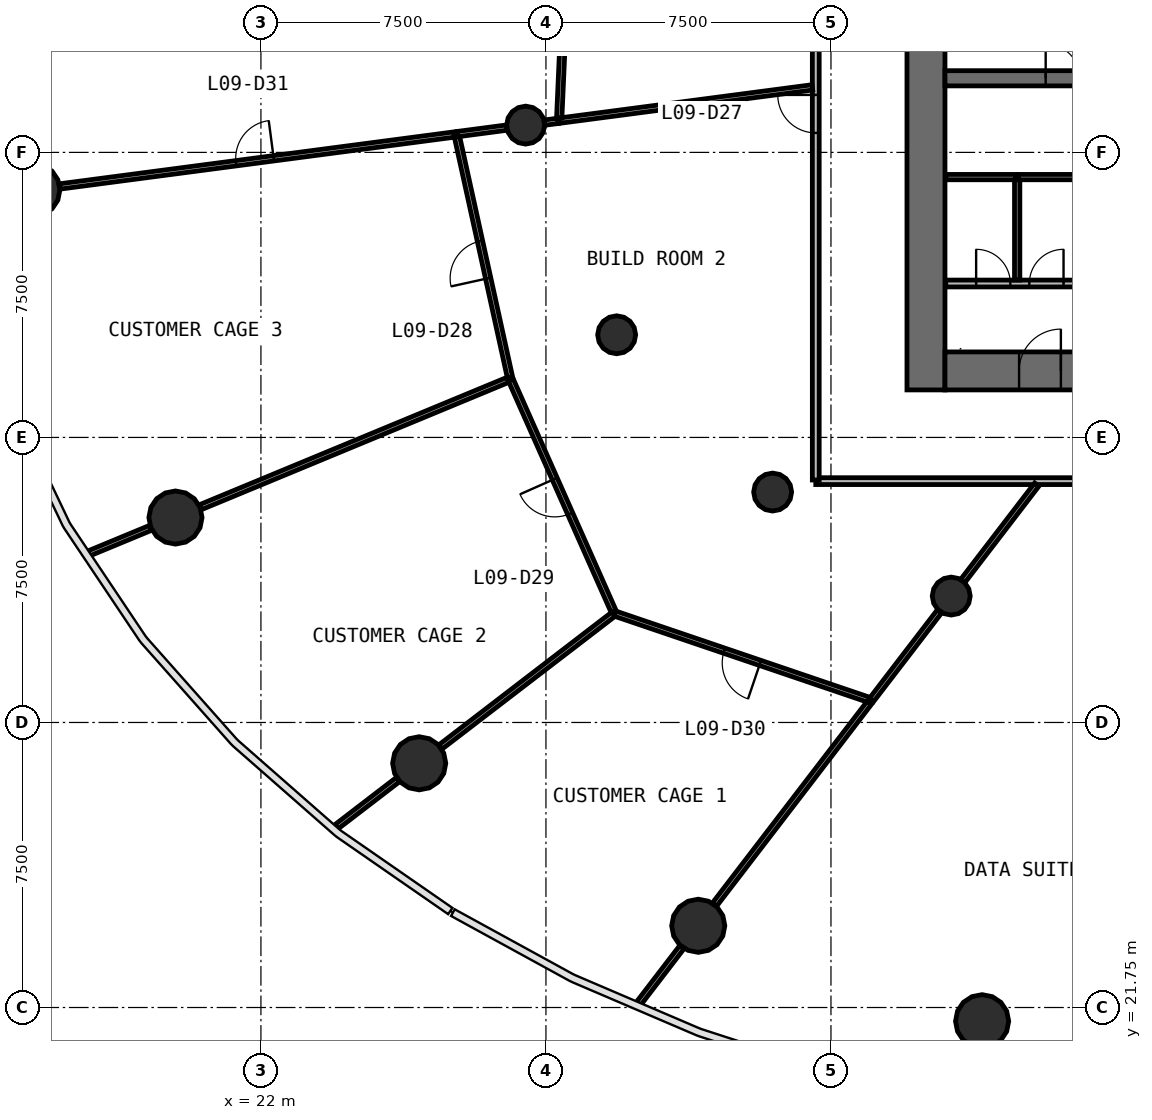
"""IFC4 building model, lengths in metres.
Left out: names, types, materials, properties, quantities, classifications, styles, units other than length and angle.
Written with IfcOpenShell. Run it as: python <this file> out.ifc"""

import sys

from ifc_helpers import new_model, si_unit, direction, frame, frame_2d, origin, origin_2d, place, context, subcontext, project, spatial, rectangle, circle, extrude, source, transform, mapped, element, fill, save


model = new_model("IFC4")
c1 = context("Model", 3, precision=1e-05, world=origin(), true_north=direction((0.0, 1.0)))
c2 = subcontext(c1, "Body", "Model", "MODEL_VIEW")
j1 = project(units=[si_unit("LENGTHUNIT", "METRE"), si_unit("PLANEANGLEUNIT", "RADIAN")], contexts=[c1])
p1 = place(None, origin())
s1 = spatial("IfcSite", under=j1, at=p1, CompositionType="ELEMENT")
p2 = place(p1, origin())
s2 = spatial("IfcBuilding", under=s1, at=p2, CompositionType="ELEMENT")
p3 = place(p2, frame((0.0, 0.0, 40.2)))
s3 = spatial("IfcBuildingStorey", under=s2, at=p3, CompositionType="ELEMENT", Elevation=40.2)
p4 = place(p3, frame((39.5, 58.0, 0.0), z_axis=(0.0, 0.0, 1.0), x_axis=(0.0, -1.0, 0.0)))
e1 = element("IfcWall", 1, at=p4, inside=s3, PredefinedType="SHEAR", context=c2, shape_type="SweptSolid", body=[
    extrude(rectangle(XDim=20.0, YDim=1.0, at=frame_2d((10.0, 0.0))), origin(), (0.0, 0.0, 1.0), 4.4),
])
p5 = place(p4, frame((9.1, 0.0, 0.0)))
e2 = element("IfcOpeningElement", 2, at=p5, cuts=e1, PredefinedType="OPENING", context=c2, shape_type="SweptSolid", body=[
    extrude(rectangle(XDim=1.8, YDim=2.1, at=frame_2d((0.9, 1.05))), frame((0.0, 0.51, 0.0), z_axis=(0.0, -1.0, 0.0), x_axis=(1.0, 0.0, 0.0)), (0.0, 0.0, 1.0), 1.02),
])
p6 = place(p3, frame((40.0, 38.5, 0.0), z_axis=(0.0, 0.0, 1.0), x_axis=(1.0, 0.0, 0.0)))
e3 = element("IfcWall", 3, at=p6, inside=s3, PredefinedType="SHEAR", context=c2, shape_type="SweptSolid", body=[
    extrude(rectangle(XDim=24.0, YDim=1.0, at=frame_2d((12.0, 0.0))), origin(), (0.0, 0.0, 1.0), 4.4),
])
p7 = place(p6, frame((21.45, 0.0, 0.0)))
e4 = element("IfcOpeningElement", 4, at=p7, cuts=e3, PredefinedType="OPENING", context=c2, shape_type="SweptSolid", body=[
    extrude(rectangle(XDim=1.1, YDim=2.1, at=frame_2d((0.55, 1.05))), frame((0.0, 0.51, 0.0), z_axis=(0.0, -1.0, 0.0), x_axis=(1.0, 0.0, 0.0)), (0.0, 0.0, 1.0), 1.02),
])
p8 = place(p6, frame((1.95, 0.0, 0.0)))
e5 = element("IfcOpeningElement", 5, at=p8, cuts=e3, PredefinedType="OPENING", context=c2, shape_type="SweptSolid", body=[
    extrude(rectangle(XDim=1.1, YDim=2.1, at=frame_2d((0.55, 1.05))), frame((0.0, 0.51, 0.0), z_axis=(0.0, -1.0, 0.0), x_axis=(1.0, 0.0, 0.0)), (0.0, 0.0, 1.0), 1.02),
])
p9 = place(p3, frame((40.0, 46.2, 0.0), z_axis=(0.0, 0.0, 1.0), x_axis=(1.0, 0.0, 0.0)))
e6 = element("IfcWall", 6, at=p9, inside=s3, PredefinedType="SHEAR", context=c2, shape_type="SweptSolid", body=[
    extrude(rectangle(XDim=24.0, YDim=0.4, at=frame_2d((12.0, 0.0))), origin(), (0.0, 0.0, 1.0), 4.4),
])
p10 = place(p9, frame((4.5, 0.0, 0.0)))
e7 = element("IfcOpeningElement", 7, at=p10, cuts=e6, PredefinedType="OPENING", context=c2, shape_type="SweptSolid", body=[
    extrude(rectangle(XDim=1.1, YDim=2.1, at=frame_2d((0.55, 1.05))), frame((0.0, 0.21, 0.0), z_axis=(0.0, -1.0, 0.0), x_axis=(1.0, 0.0, 0.0)), (0.0, 0.0, 1.0), 0.42),
])
p11 = place(p9, frame((7.0, 0.0, 0.0)))
e8 = element("IfcOpeningElement", 8, at=p11, cuts=e6, PredefinedType="OPENING", context=c2, shape_type="SweptSolid", body=[
    extrude(rectangle(XDim=1.1, YDim=2.1, at=frame_2d((0.55, 1.05))), frame((0.0, 0.21, 0.0), z_axis=(0.0, -1.0, 0.0), x_axis=(1.0, 0.0, 0.0)), (0.0, 0.0, 1.0), 0.42),
])
p12 = place(p9, frame((9.5, 0.0, 0.0)))
e9 = element("IfcOpeningElement", 9, at=p12, cuts=e6, PredefinedType="OPENING", context=c2, shape_type="SweptSolid", body=[
    extrude(rectangle(XDim=1.1, YDim=2.1, at=frame_2d((0.55, 1.05))), frame((0.0, 0.21, 0.0), z_axis=(0.0, -1.0, 0.0), x_axis=(1.0, 0.0, 0.0)), (0.0, 0.0, 1.0), 0.42),
])
p13 = place(p9, frame((20.45, 0.0, 0.0)))
e10 = element("IfcOpeningElement", 10, at=p13, cuts=e6, PredefinedType="OPENING", context=c2, shape_type="SweptSolid", body=[
    extrude(rectangle(XDim=0.9, YDim=2.1, at=frame_2d((0.45, 1.05))), frame((0.0, 0.21, 0.0), z_axis=(0.0, -1.0, 0.0), x_axis=(1.0, 0.0, 0.0)), (0.0, 0.0, 1.0), 0.42),
])
p14 = place(p9, frame((2.65, 0.0, 0.0)))
e11 = element("IfcOpeningElement", 11, at=p14, cuts=e6, PredefinedType="OPENING", context=c2, shape_type="SweptSolid", body=[
    extrude(rectangle(XDim=0.9, YDim=2.1, at=frame_2d((0.45, 1.05))), frame((0.0, 0.21, 0.0), z_axis=(0.0, -1.0, 0.0), x_axis=(1.0, 0.0, 0.0)), (0.0, 0.0, 1.0), 0.42),
])
p15 = place(p9, frame((11.65, 0.0, 0.0)))
e12 = element("IfcOpeningElement", 12, at=p15, cuts=e6, PredefinedType="OPENING", context=c2, shape_type="SweptSolid", body=[
    extrude(rectangle(XDim=0.9, YDim=2.1, at=frame_2d((0.45, 1.05))), frame((0.0, 0.21, 0.0), z_axis=(0.0, -1.0, 0.0), x_axis=(1.0, 0.0, 0.0)), (0.0, 0.0, 1.0), 0.42),
])
m1 = source(origin(), c2, "Body", "SweptSolid", [
    extrude(circle(Radius=0.7, at=origin_2d()), origin(), (0.0, 0.0, 1.0), 4.4),
])
for number, where, z_axis, x_axis in (
    (13, (16.01, 43.262, 0.0), (0.0, 0.0, 1.0), (1.0, 0.0, 0.0)),
    (14, (19.751, 34.642, 0.0), (0.0, 0.0, 1.0), (1.0, 0.0, 0.0)),
    (15, (26.164, 28.176, 0.0), (0.0, 0.0, 1.0), (1.0, 0.0, 0.0)),
    (16, (33.508, 23.9, 0.0), (0.0, 0.0, 1.0), (1.0, 0.0, 0.0)),
    (17, (40.977, 21.389, 0.0), (0.0, 0.0, 1.0), (1.0, 0.0, 0.0)),
):
    element("IfcColumn", number, at=place(p3, frame(where, z_axis=z_axis, x_axis=x_axis)), inside=s3, PredefinedType="COLUMN", context=c2, shape_type="MappedRepresentation", body=[
        mapped(m1, transform((0.0, 0.0, 0.0), scale=1.0)),
    ])
m2 = source(origin(), c2, "Body", "SweptSolid", [
    extrude(circle(Radius=0.5, at=origin_2d()), origin(), (0.0, 0.0, 1.0), 4.4),
])
for number, where, z_axis, x_axis in (
    (18, (28.966, 44.968, 0.0), (0.0, 0.0, 1.0), (1.0, 0.0, 0.0)),
    (19, (31.361, 39.451, 0.0), (0.0, 0.0, 1.0), (1.0, 0.0, 0.0)),
    (20, (35.465, 35.312, 0.0), (0.0, 0.0, 1.0), (1.0, 0.0, 0.0)),
    (21, (40.165, 32.576, 0.0), (0.0, 0.0, 1.0), (1.0, 0.0, 0.0)),
):
    element("IfcColumn", number, at=place(p3, frame(where, z_axis=z_axis, x_axis=x_axis)), inside=s3, PredefinedType="COLUMN", context=c2, shape_type="MappedRepresentation", body=[
        mapped(m2, transform((0.0, 0.0, 0.0), scale=1.0)),
    ])
p16 = place(p3, frame((67.4, 35.6, 0.0), z_axis=(0.0, 0.0, 1.0), x_axis=(-1.0, 0.0, 0.0)))
e22 = element("IfcWall", 22, at=p16, inside=s3, PredefinedType="PARTITIONING", context=c2, shape_type="SweptSolid", body=[
    extrude(rectangle(XDim=30.8, YDim=0.18, at=frame_2d((15.4, 0.0))), origin(), (0.0, 0.0, 1.0), 3.05),
])
p17 = place(p16, frame((17.35, 0.0, 0.0)))
e23 = element("IfcOpeningElement", 23, at=p17, cuts=e22, PredefinedType="OPENING", context=c2, shape_type="SweptSolid", body=[
    extrude(rectangle(XDim=1.0, YDim=2.1, at=frame_2d((0.5, 1.05))), frame((0.0, 0.1, 0.0), z_axis=(0.0, -1.0, 0.0), x_axis=(1.0, 0.0, 0.0)), (0.0, 0.0, 1.0), 0.2),
])
p18 = place(p16, frame((14.95, 0.0, 0.0)))
e24 = element("IfcOpeningElement", 24, at=p18, cuts=e22, PredefinedType="OPENING", context=c2, shape_type="SweptSolid", body=[
    extrude(rectangle(XDim=1.0, YDim=2.1, at=frame_2d((0.5, 1.05))), frame((0.0, 0.1, 0.0), z_axis=(0.0, -1.0, 0.0), x_axis=(1.0, 0.0, 0.0)), (0.0, 0.0, 1.0), 0.2),
])
p19 = place(p3, frame((36.6, 35.63, 0.0), z_axis=(0.0, 0.0, 1.0), x_axis=(0.0, 1.0, 0.0)))
e25 = element("IfcWall", 25, at=p19, inside=s3, PredefinedType="PARTITIONING", context=c2, shape_type="SweptSolid", body=[
    extrude(rectangle(XDim=23.583, YDim=0.18, at=frame_2d((11.791, 0.0))), origin(), (0.0, 0.0, 1.0), 3.05),
])
p20 = place(p19, frame((16.032, 0.0, 0.0)))
e26 = element("IfcOpeningElement", 26, at=p20, cuts=e25, PredefinedType="OPENING", context=c2, shape_type="SweptSolid", body=[
    extrude(rectangle(XDim=0.9, YDim=2.1, at=frame_2d((0.45, 1.05))), frame((0.0, 0.1, 0.0), z_axis=(0.0, -1.0, 0.0), x_axis=(1.0, 0.0, 0.0)), (0.0, 0.0, 1.0), 0.2),
])
p21 = place(p19, frame((13.232, 0.0, 0.0)))
e27 = element("IfcOpeningElement", 27, at=p21, cuts=e25, PredefinedType="OPENING", context=c2, shape_type="SweptSolid", body=[
    extrude(rectangle(XDim=0.9, YDim=2.1, at=frame_2d((0.45, 1.05))), frame((0.0, 0.1, 0.0), z_axis=(0.0, -1.0, 0.0), x_axis=(1.0, 0.0, 0.0)), (0.0, 0.0, 1.0), 0.2),
])
p22 = place(p19, frame((11.433, 0.0, 0.0)))
e28 = element("IfcOpeningElement", 28, at=p22, cuts=e25, PredefinedType="OPENING", context=c2, shape_type="SweptSolid", body=[
    extrude(rectangle(XDim=0.9, YDim=2.1, at=frame_2d((0.45, 1.05))), frame((0.0, 0.1, 0.0), z_axis=(0.0, -1.0, 0.0), x_axis=(1.0, 0.0, 0.0)), (0.0, 0.0, 1.0), 0.2),
])
p23 = place(p19, frame((9.133, 0.0, 0.0)))
e29 = element("IfcOpeningElement", 29, at=p23, cuts=e25, PredefinedType="OPENING", context=c2, shape_type="SweptSolid", body=[
    extrude(rectangle(XDim=1.0, YDim=2.1, at=frame_2d((0.5, 1.05))), frame((0.0, 0.1, 0.0), z_axis=(0.0, -1.0, 0.0), x_axis=(1.0, 0.0, 0.0)), (0.0, 0.0, 1.0), 0.2),
])
p24 = place(p19, frame((19.133, 0.0, 0.0)))
e30 = element("IfcOpeningElement", 30, at=p24, cuts=e25, PredefinedType="OPENING", context=c2, shape_type="SweptSolid", body=[
    extrude(rectangle(XDim=1.0, YDim=2.1, at=frame_2d((0.5, 1.05))), frame((0.0, 0.1, 0.0), z_axis=(0.0, -1.0, 0.0), x_axis=(1.0, 0.0, 0.0)), (0.0, 0.0, 1.0), 0.2),
])
p25 = place(p3, frame((40.02, 40.8, 0.0), z_axis=(0.0, 0.0, 1.0), x_axis=(1.0, 0.0, 0.0)))
e31 = element("IfcWall", 31, at=p25, inside=s3, PredefinedType="PARTITIONING", context=c2, shape_type="SweptSolid", body=[
    extrude(rectangle(XDim=3.75, YDim=0.18, at=frame_2d((1.875, 0.0))), origin(), (0.0, 0.0, 1.0), 3.95),
])
p26 = place(p25, frame((0.8, 0.0, 0.0)))
e32 = element("IfcOpeningElement", 32, at=p26, cuts=e31, PredefinedType="OPENING", context=c2, shape_type="SweptSolid", body=[
    extrude(rectangle(XDim=0.9, YDim=2.1, at=frame_2d((0.45, 1.05))), frame((0.0, 0.1, 0.0), z_axis=(0.0, -1.0, 0.0), x_axis=(1.0, 0.0, 0.0)), (0.0, 0.0, 1.0), 0.2),
])
p27 = place(p25, frame((2.2, 0.0, 0.0)))
e33 = element("IfcOpeningElement", 33, at=p27, cuts=e31, PredefinedType="OPENING", context=c2, shape_type="SweptSolid", body=[
    extrude(rectangle(XDim=0.9, YDim=2.1, at=frame_2d((0.45, 1.05))), frame((0.0, 0.1, 0.0), z_axis=(0.0, -1.0, 0.0), x_axis=(1.0, 0.0, 0.0)), (0.0, 0.0, 1.0), 0.2),
])
p28 = place(p3, frame((16.708, 43.354, 0.0), z_axis=(0.0, 0.0, 1.0), x_axis=(0.991445294361, 0.130522903314, 0.0)))
e34 = element("IfcWall", 34, at=p28, inside=s3, PredefinedType="PARTITIONING", context=c2, shape_type="SweptSolid", body=[
    extrude(rectangle(XDim=10.527, YDim=0.14, at=frame_2d((5.264, 0.0))), origin(), (0.0, 0.0, 1.0), 3.05),
])
p29 = place(p28, frame((4.677, 0.0, 0.0)))
e35 = element("IfcOpeningElement", 35, at=p29, cuts=e34, PredefinedType="OPENING", context=c2, shape_type="SweptSolid", body=[
    extrude(rectangle(XDim=1.0, YDim=2.1, at=frame_2d((0.5, 1.05))), frame((0.0, 0.08, 0.0), z_axis=(0.0, -1.0, 0.0), x_axis=(1.0, 0.0, 0.0)), (0.0, 0.0, 1.0), 0.16),
])
p30 = place(p3, frame((28.562, 38.292, 0.0), z_axis=(0.0, 0.0, 1.0), x_axis=(-0.923878024318, -0.382687073445, 0.0)))
e36 = element("IfcWall", 36, at=p30, inside=s3, PredefinedType="PARTITIONING", context=c2, shape_type="SweptSolid", body=[
    extrude(rectangle(XDim=8.832, YDim=0.14, at=frame_2d((4.416, 0.0))), origin(), (0.0, 0.0, 1.0), 3.05),
])
p31 = place(p3, frame((38.055, 29.826, 0.0), z_axis=(0.0, 0.0, 1.0), x_axis=(-0.946877260645, 0.321595169854, 0.0)))
e37 = element("IfcWall", 37, at=p31, inside=s3, PredefinedType="PARTITIONING", context=c2, shape_type="SweptSolid", body=[
    extrude(rectangle(XDim=7.13, YDim=0.14, at=frame_2d((3.565, 0.0))), origin(), (0.0, 0.0, 1.0), 3.05),
])
p32 = place(p31, frame((3.08, 0.0, 0.0)))
e38 = element("IfcOpeningElement", 38, at=p32, cuts=e37, PredefinedType="OPENING", context=c2, shape_type="SweptSolid", body=[
    extrude(rectangle(XDim=1.0, YDim=2.1, at=frame_2d((0.5, 1.05))), frame((0.0, 0.08, 0.0), z_axis=(0.0, -1.0, 0.0), x_axis=(1.0, 0.0, 0.0)), (0.0, 0.0, 1.0), 0.16),
])
p33 = place(p3, frame((36.51, 45.961, 0.0), z_axis=(0.0, 0.0, 1.0), x_axis=(-0.991446999642, -0.130509949431, 0.0)))
e39 = element("IfcWall", 39, at=p33, inside=s3, PredefinedType="PARTITIONING", context=c2, shape_type="SweptSolid", body=[
    extrude(rectangle(XDim=6.721, YDim=0.14, at=frame_2d((3.361, 0.0))), origin(), (0.0, 0.0, 1.0), 3.05),
])
p34 = place(p3, frame((38.01, 29.768, 0.0), z_axis=(0.0, 0.0, 1.0), x_axis=(-0.608789949358, -0.793331455043, 0.0)))
e40 = element("IfcWall", 40, at=p34, inside=s3, PredefinedType="PARTITIONING", context=c2, shape_type="SweptSolid", body=[
    extrude(rectangle(XDim=6.691, YDim=0.14, at=frame_2d((3.346, 0.0))), origin(), (0.0, 0.0, 1.0), 3.05),
])
p35 = place(p3, frame((31.292, 32.146, 0.0), z_axis=(0.0, 0.0, 1.0), x_axis=(-0.40591511996, 0.913910780869, 0.0)))
e41 = element("IfcWall", 41, at=p35, inside=s3, PredefinedType="PARTITIONING", context=c2, shape_type="SweptSolid", body=[
    extrude(rectangle(XDim=6.694, YDim=0.14, at=frame_2d((3.347, 0.0))), origin(), (0.0, 0.0, 1.0), 3.05),
])
p36 = place(p35, frame((2.844, 0.0, 0.0)))
e42 = element("IfcOpeningElement", 42, at=p36, cuts=e41, PredefinedType="OPENING", context=c2, shape_type="SweptSolid", body=[
    extrude(rectangle(XDim=1.0, YDim=2.1, at=frame_2d((0.5, 1.05))), frame((0.0, 0.08, 0.0), z_axis=(0.0, -1.0, 0.0), x_axis=(1.0, 0.0, 0.0)), (0.0, 0.0, 1.0), 0.16),
])
p37 = place(p3, frame((28.556, 38.321, 0.0), z_axis=(0.0, 0.0, 1.0), x_axis=(-0.21508144295, 0.976596115546, 0.0)))
e43 = element("IfcWall", 43, at=p37, inside=s3, PredefinedType="PARTITIONING", context=c2, shape_type="SweptSolid", body=[
    extrude(rectangle(XDim=6.53, YDim=0.14, at=frame_2d((3.265, 0.0))), origin(), (0.0, 0.0, 1.0), 3.05),
])
p38 = place(p37, frame((2.68, 0.0, 0.0)))
e44 = element("IfcOpeningElement", 44, at=p38, cuts=e43, PredefinedType="OPENING", context=c2, shape_type="SweptSolid", body=[
    extrude(rectangle(XDim=1.0, YDim=2.1, at=frame_2d((0.5, 1.05))), frame((0.0, 0.08, 0.0), z_axis=(0.0, -1.0, 0.0), x_axis=(1.0, 0.0, 0.0)), (0.0, 0.0, 1.0), 0.16),
])
p39 = place(p3, frame((31.28, 32.101, 0.0), z_axis=(0.0, 0.0, 1.0), x_axis=(-0.793356588495, -0.608757195844, 0.0)))
e45 = element("IfcWall", 45, at=p39, inside=s3, PredefinedType="PARTITIONING", context=c2, shape_type="SweptSolid", body=[
    extrude(rectangle(XDim=5.744, YDim=0.14, at=frame_2d((2.872, 0.0))), origin(), (0.0, 0.0, 1.0), 3.05),
])
p40 = place(p3, frame((30.08, 50.377, 0.0), z_axis=(0.0, 0.0, 1.0), x_axis=(-0.044134411389, -0.99902560214, 0.0)))
e46 = element("IfcWall", 46, at=p40, inside=s3, PredefinedType="PARTITIONING", context=c2, shape_type="SweptSolid", body=[
    extrude(rectangle(XDim=5.228, YDim=0.14, at=frame_2d((2.614, 0.0))), origin(), (0.0, 0.0, 1.0), 3.05),
])
p41 = place(p3, frame((42.416, 35.51, 0.0), z_axis=(0.0, 0.0, 1.0), x_axis=(-0.60874605662, -0.793365135703, 0.0)))
e47 = element("IfcWall", 47, at=p41, inside=s3, PredefinedType="PARTITIONING", context=c2, shape_type="SweptSolid", body=[
    extrude(rectangle(XDim=3.194, YDim=0.14, at=frame_2d((1.597, 0.0))), origin(), (0.0, 0.0, 1.0), 3.05),
])
p42 = place(p3, frame((39.858, 32.176, 0.0), z_axis=(0.0, 0.0, 1.0), x_axis=(-0.608796847525, -0.793326161452, 0.0)))
e48 = element("IfcWall", 48, at=p42, inside=s3, PredefinedType="PARTITIONING", context=c2, shape_type="SweptSolid", body=[
    extrude(rectangle(XDim=2.932, YDim=0.14, at=frame_2d((1.466, 0.0))), origin(), (0.0, 0.0, 1.0), 3.05),
])
p43 = place(p3, frame((41.9, 40.89, 0.0), z_axis=(0.0, 0.0, 1.0), x_axis=(0.0, 1.0, 0.0)))
e49 = element("IfcWall", 49, at=p43, inside=s3, PredefinedType="PARTITIONING", context=c2, shape_type="SweptSolid", body=[
    extrude(rectangle(XDim=2.71, YDim=0.14, at=frame_2d((1.355, 0.0))), origin(), (0.0, 0.0, 1.0), 3.05),
])
p44 = place(p3, frame((25.606, 27.747, 0.0), z_axis=(0.0, 0.0, 1.0), x_axis=(-0.793363183119, -0.608748601372, 0.0)))
e50 = element("IfcWall", 50, at=p44, inside=s3, PredefinedType="PARTITIONING", context=c2, shape_type="SweptSolid", body=[
    extrude(rectangle(XDim=2.037, YDim=0.14, at=frame_2d((1.018, 0.0))), origin(), (0.0, 0.0, 1.0), 3.05),
])
p45 = place(p3, frame((43.77, 43.6, 0.0), z_axis=(0.0, 0.0, 1.0), x_axis=(-1.0, 0.0, 0.0)))
e51 = element("IfcWall", 51, at=p45, inside=s3, PredefinedType="PARTITIONING", context=c2, shape_type="SweptSolid", body=[
    extrude(rectangle(XDim=1.84, YDim=0.14, at=frame_2d((0.92, 0.0))), origin(), (0.0, 0.0, 1.0), 3.05),
])
p46 = place(p3, frame((41.87, 43.6, 0.0), z_axis=(0.0, 0.0, 1.0), x_axis=(-1.0, 0.0, 0.0)))
e52 = element("IfcWall", 52, at=p46, inside=s3, PredefinedType="PARTITIONING", context=c2, shape_type="SweptSolid", body=[
    extrude(rectangle(XDim=1.85, YDim=0.14, at=frame_2d((0.925, 0.0))), origin(), (0.0, 0.0, 1.0), 3.05),
])
p47 = place(p3, frame((33.079, 23.342, 0.0), z_axis=(0.0, 0.0, 1.0), x_axis=(-0.608792119063, -0.793329790041, 0.0)))
e53 = element("IfcWall", 53, at=p47, inside=s3, PredefinedType="PARTITIONING", context=c2, shape_type="SweptSolid", body=[
    extrude(rectangle(XDim=1.876, YDim=0.14, at=frame_2d((0.938, 0.0))), origin(), (0.0, 0.0, 1.0), 3.05),
])
p48 = place(p3, frame((19.1, 34.372, 0.0), z_axis=(0.0, 0.0, 1.0), x_axis=(-0.92390604877, -0.382619410179, 0.0)))
e54 = element("IfcWall", 54, at=p48, inside=s3, PredefinedType="PARTITIONING", context=c2, shape_type="SweptSolid", body=[
    extrude(rectangle(XDim=1.772, YDim=0.14, at=frame_2d((0.886, 0.0))), origin(), (0.0, 0.0, 1.0), 3.05),
])
p49 = place(p3, frame((28.466, 44.902, 0.0), z_axis=(0.0, 0.0, 1.0), x_axis=(-0.991458759568, -0.130420581489, 0.0)))
e55 = element("IfcWall", 55, at=p49, inside=s3, PredefinedType="PARTITIONING", context=c2, shape_type="SweptSolid", body=[
    extrude(rectangle(XDim=1.303, YDim=0.14, at=frame_2d((0.651, 0.0))), origin(), (0.0, 0.0, 1.0), 3.05),
])
p50 = place(p3, frame((29.816, 45.08, 0.0), z_axis=(0.0, 0.0, 1.0), x_axis=(-0.99142603388, -0.13066912162, 0.0)))
e56 = element("IfcWall", 56, at=p50, inside=s3, PredefinedType="PARTITIONING", context=c2, shape_type="SweptSolid", body=[
    extrude(rectangle(XDim=0.353, YDim=0.14, at=frame_2d((0.177, 0.0))), origin(), (0.0, 0.0, 1.0), 3.05),
])
m3 = source(origin(), c2, "Body", "SweptSolid", [
    extrude(rectangle(XDim=1.1, YDim=2.1, at=frame_2d((0.55, 1.05))), frame((0.0, 0.025, 0.0), z_axis=(0.0, -1.0, 0.0), x_axis=(1.0, 0.0, 0.0)), (0.0, 0.0, 1.0), 0.05),
])
p51 = place(p8, origin())
e57 = element("IfcDoor", 57, at=p51, inside=s3, OperationType="SINGLE_SWING_RIGHT", PredefinedType="DOOR", context=c2, shape_type="MappedRepresentation", body=[
    mapped(m3, transform((0.0, 0.0, 0.0), scale=1.0)),
])
fill(e5, e57)
m4 = source(origin(), c2, "Body", "SweptSolid", [
    extrude(rectangle(XDim=1.0, YDim=2.1, at=frame_2d((0.5, 1.05))), frame((0.0, 0.025, 0.0), z_axis=(0.0, -1.0, 0.0), x_axis=(1.0, 0.0, 0.0)), (0.0, 0.0, 1.0), 0.05),
])
p52 = place(p23, origin())
e58 = element("IfcDoor", 58, at=p52, inside=s3, OperationType="SINGLE_SWING_RIGHT", PredefinedType="DOOR", context=c2, shape_type="MappedRepresentation", body=[
    mapped(m4, transform((0.0, 0.0, 0.0), scale=1.0)),
])
fill(e29, e58)
p53 = place(p38, origin())
e59 = element("IfcDoor", 59, at=p53, inside=s3, OperationType="SINGLE_SWING_LEFT", PredefinedType="DOOR", context=c2, shape_type="MappedRepresentation", body=[
    mapped(m4, transform((0.0, 0.0, 0.0), scale=1.0)),
])
fill(e44, e59)
p54 = place(p36, origin())
e60 = element("IfcDoor", 60, at=p54, inside=s3, OperationType="SINGLE_SWING_RIGHT", PredefinedType="DOOR", context=c2, shape_type="MappedRepresentation", body=[
    mapped(m4, transform((0.0, 0.0, 0.0), scale=1.0)),
])
fill(e42, e60)
p55 = place(p32, origin())
e61 = element("IfcDoor", 61, at=p55, inside=s3, OperationType="SINGLE_SWING_LEFT", PredefinedType="DOOR", context=c2, shape_type="MappedRepresentation", body=[
    mapped(m4, transform((0.0, 0.0, 0.0), scale=1.0)),
])
fill(e38, e61)
p56 = place(p29, origin())
e62 = element("IfcDoor", 62, at=p56, inside=s3, OperationType="SINGLE_SWING_RIGHT", PredefinedType="DOOR", context=c2, shape_type="MappedRepresentation", body=[
    mapped(m4, transform((0.0, 0.0, 0.0), scale=1.0)),
])
fill(e35, e62)
m5 = source(origin(), c2, "Body", "SweptSolid", [
    extrude(rectangle(XDim=0.9, YDim=2.1, at=frame_2d((0.45, 1.05))), frame((0.0, 0.025, 0.0), z_axis=(0.0, -1.0, 0.0), x_axis=(1.0, 0.0, 0.0)), (0.0, 0.0, 1.0), 0.05),
])
p57 = place(p26, origin())
e63 = element("IfcDoor", 63, at=p57, inside=s3, OperationType="SINGLE_SWING_LEFT", PredefinedType="DOOR", context=c2, shape_type="MappedRepresentation", body=[
    mapped(m5, transform((0.0, 0.0, 0.0), scale=1.0)),
])
fill(e32, e63)
p58 = place(p27, origin())
e64 = element("IfcDoor", 64, at=p58, inside=s3, OperationType="SINGLE_SWING_RIGHT", PredefinedType="DOOR", context=c2, shape_type="MappedRepresentation", body=[
    mapped(m5, transform((0.0, 0.0, 0.0), scale=1.0)),
])
fill(e33, e64)
p59 = place(p14, origin())
e65 = element("IfcDoor", 65, at=p59, inside=s3, OperationType="SINGLE_SWING_LEFT", PredefinedType="DOOR", context=c2, shape_type="MappedRepresentation", body=[
    mapped(m5, transform((0.0, 0.0, 0.0), scale=1.0)),
])
fill(e11, e65)
save(model, sys.argv[1])
